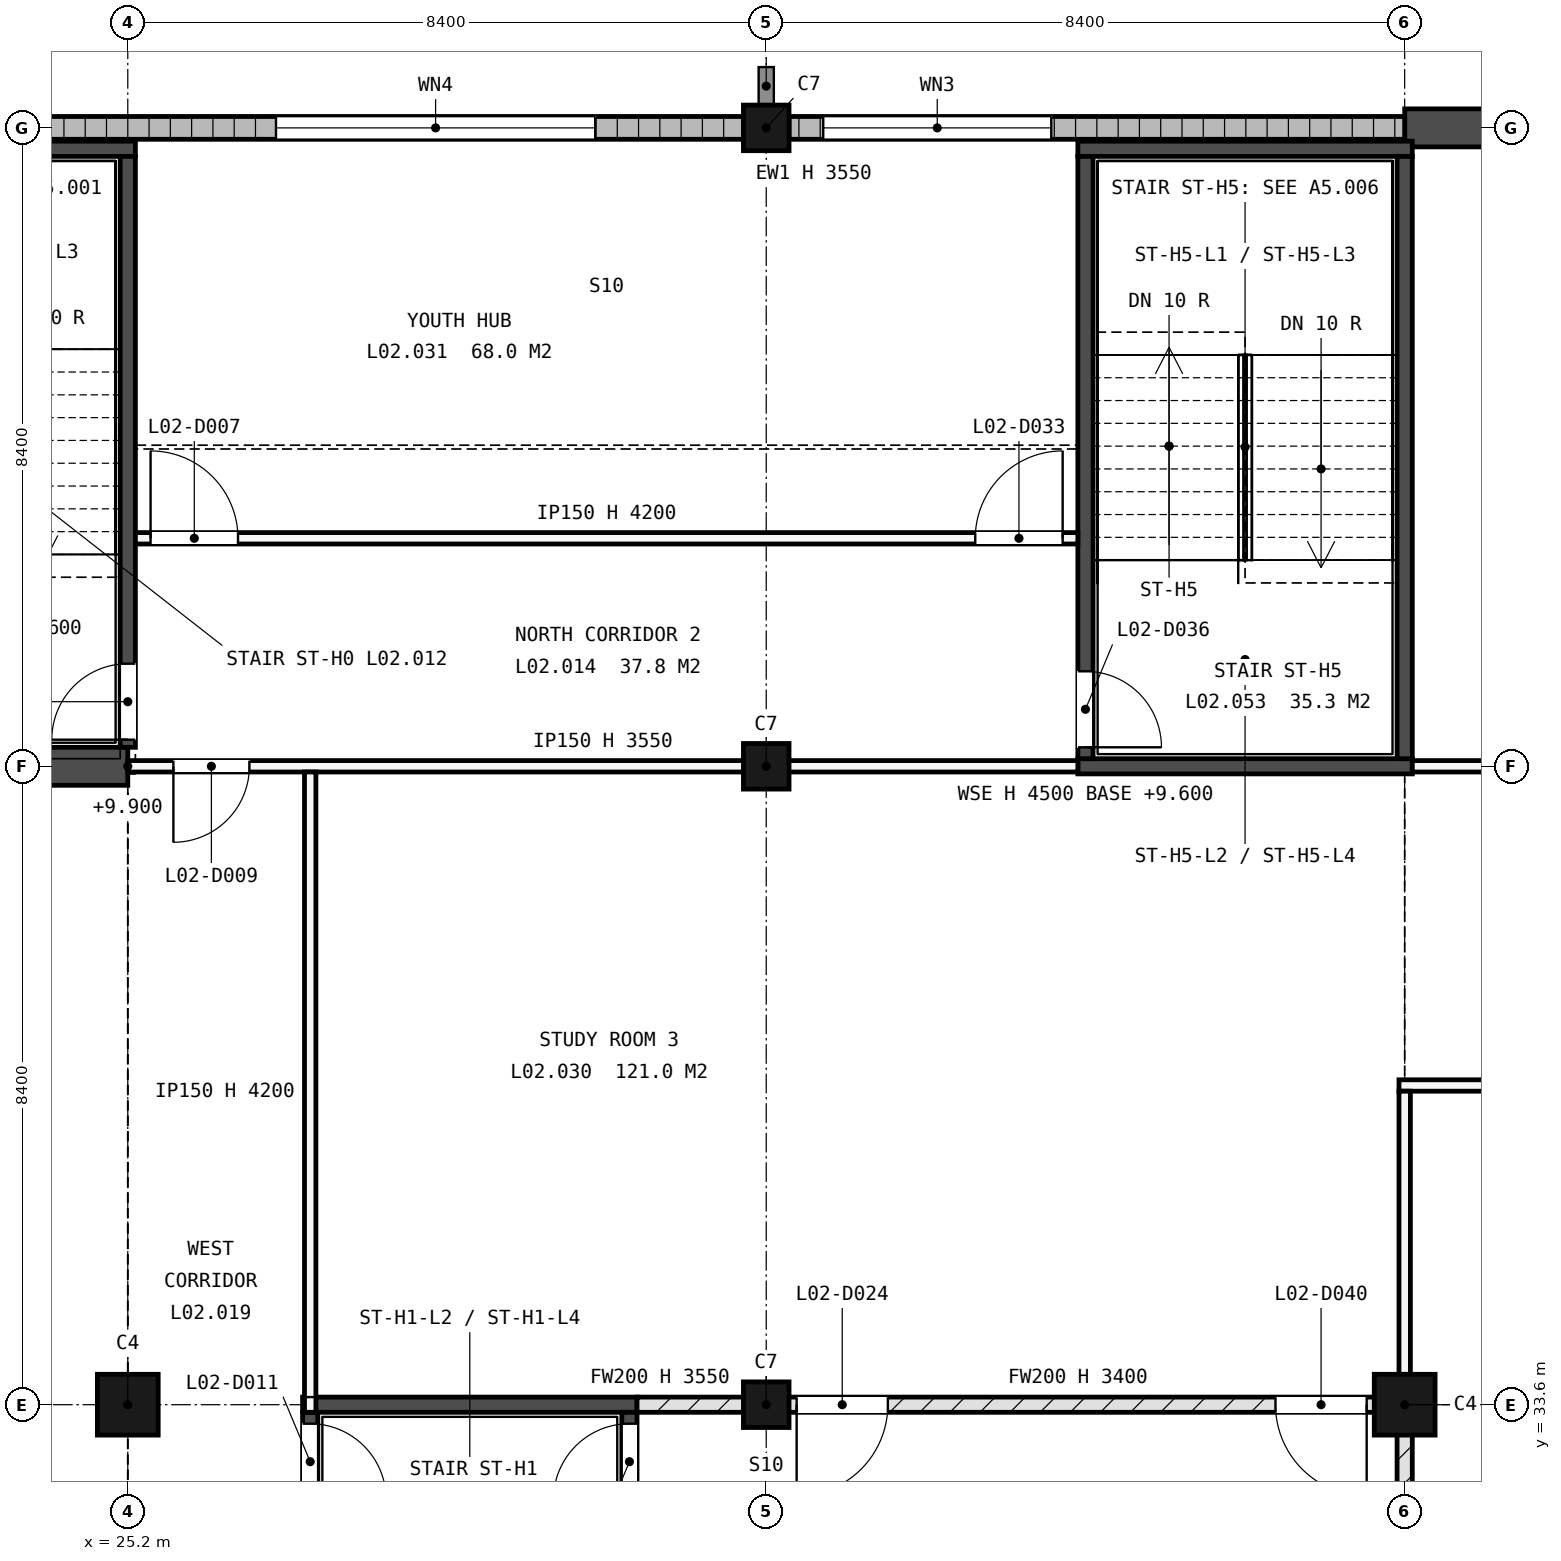
"""IFC4 building model, lengths in metres.
Left out: names, types, materials, properties, quantities, classifications, styles, units other than length and angle.
Written with IfcOpenShell. Run it as: python <this file> out.ifc"""

import sys

from ifc_helpers import new_model, si_unit, direction, frame, frame_2d, origin, origin_2d, place, context, subcontext, project, spatial, polyline, rectangle, outline, extrude, element, fill, save


model = new_model("IFC4")
c1 = context("Model", 3, precision=1e-05, world=origin(), true_north=direction((0.0, 1.0)))
c2 = subcontext(c1, "Body", "Model", "MODEL_VIEW")
j1 = project(units=[si_unit("LENGTHUNIT", "METRE"), si_unit("PLANEANGLEUNIT", "RADIAN")], contexts=[c1])
p1 = place(None, origin())
s1 = spatial("IfcSite", under=j1, at=p1, CompositionType="ELEMENT")
p2 = place(p1, origin())
s2 = spatial("IfcBuilding", under=s1, at=p2, CompositionType="ELEMENT")
p3 = place(p2, frame((0.0, 0.0, 9.9)))
s3 = spatial("IfcBuildingStorey", under=s2, at=p3, CompositionType="ELEMENT", Elevation=9.9)
p4 = place(p3, frame((25.2, 33.6, -0.25), z_axis=(0.0, 0.0, 1.0), x_axis=(1.0, 0.0, 0.0)))
e1 = element("IfcColumn", 1, at=p4, inside=s3, PredefinedType="COLUMN", context=c2, shape_type="SweptSolid", body=[
    extrude(rectangle(XDim=0.8, YDim=0.8, at=origin_2d()), origin(), (0.0, 0.0, 1.0), 4.45),
])
for number, where, z_axis, x_axis in (
    (2, (33.6, 33.6, -0.25), (0.0, 0.0, 1.0), (1.0, 0.0, 0.0)),
    (3, (33.6, 42.0, -0.25), (0.0, 0.0, 1.0), (1.0, 0.0, 0.0)),
    (4, (33.6, 50.4, -0.25), (0.0, 0.0, 1.0), (1.0, 0.0, 0.0)),
):
    element("IfcColumn", number, at=place(p3, frame(where, z_axis=z_axis, x_axis=x_axis)), inside=s3, PredefinedType="COLUMN", context=c2, shape_type="SweptSolid", body=[
        extrude(rectangle(XDim=0.6, YDim=0.6, at=origin_2d()), origin(), (0.0, 0.0, 1.0), 4.45),
    ])
p5 = place(p3, frame((42.0, 33.6, -0.25), z_axis=(0.0, 0.0, 1.0), x_axis=(1.0, 0.0, 0.0)))
e5 = element("IfcColumn", 5, at=p5, inside=s3, PredefinedType="COLUMN", context=c2, shape_type="SweptSolid", body=[
    extrude(rectangle(XDim=0.8, YDim=0.8, at=origin_2d()), origin(), (0.0, 0.0, 1.0), 4.45),
])
p6 = place(p3, frame((42.0, 50.4, -0.25), z_axis=(0.0, 0.0, 1.0), x_axis=(1.0, 0.0, 0.0)))
e6 = element("IfcWall", 6, at=p6, inside=s3, PredefinedType="SHEAR", context=c2, shape_type="SweptSolid", body=[
    extrude(rectangle(XDim=42.0, YDim=0.5, at=frame_2d((21.0, 0.0))), origin(), (0.0, 0.0, 1.0), 4.45),
])
p7 = place(p3, frame((0.0, 42.0, -0.25), z_axis=(0.0, 0.0, 1.0), x_axis=(1.0, 0.0, 0.0)))
e7 = element("IfcWall", 7, at=p7, inside=s3, PredefinedType="SHEAR", context=c2, shape_type="SweptSolid", body=[
    extrude(outline(polyline([(0.0, 0.0), (25.2, 0.0), (25.201, 0.05), (25.2, 4.45), (21.0, 4.45), (20.999, 3.973), (16.8, 0.05), (12.6, 3.974), (8.4, 0.05), (4.2, 3.974), (0.0, 0.05), (0.0, 0.0)])), frame((0.0, 0.25, 0.0), z_axis=(0.0, -1.0, 0.0), x_axis=(1.0, 0.0, 0.0)), (0.0, 0.0, 1.0), 0.5),
])
p8 = place(p3, frame((17.1, 50.4, 0.0), z_axis=(0.0, 0.0, 1.0), x_axis=(1.0, 0.0, 0.0)))
e8 = element("IfcWall", 8, at=p8, inside=s3, PredefinedType="STANDARD", context=c2, shape_type="SweptSolid", body=[
    extrude(rectangle(XDim=16.2, YDim=0.3, at=frame_2d((8.1, 0.0))), origin(), (0.0, 0.0, 1.0), 3.55),
])
p9 = place(p8, frame((0.45, 0.0, 2.4)))
e9 = element("IfcOpeningElement", 9, at=p9, cuts=e8, PredefinedType="OPENING", context=c2, shape_type="SweptSolid", body=[
    extrude(rectangle(XDim=3.0, YDim=0.9, at=frame_2d((1.5, 0.45))), frame((0.0, 0.16, 0.0), z_axis=(0.0, -1.0, 0.0), x_axis=(1.0, 0.0, 0.0)), (0.0, 0.0, 1.0), 0.32),
])
p10 = place(p8, frame((10.05, 0.0, 0.9)))
e10 = element("IfcOpeningElement", 10, at=p10, cuts=e8, PredefinedType="OPENING", context=c2, shape_type="SweptSolid", body=[
    extrude(rectangle(XDim=4.2, YDim=1.5, at=frame_2d((2.1, 0.75))), frame((0.0, 0.16, 0.0), z_axis=(0.0, -1.0, 0.0), x_axis=(1.0, 0.0, 0.0)), (0.0, 0.0, 1.0), 0.32),
])
p11 = place(p3, frame((33.9, 50.4, 0.0), z_axis=(0.0, 0.0, 1.0), x_axis=(1.0, 0.0, 0.0)))
e11 = element("IfcWall", 11, at=p11, inside=s3, PredefinedType="STANDARD", context=c2, shape_type="SweptSolid", body=[
    extrude(rectangle(XDim=8.1, YDim=0.3, at=frame_2d((4.05, 0.0))), origin(), (0.0, 0.0, 1.0), 3.55),
])
p12 = place(p11, frame((0.45, 0.0, 0.9)))
e12 = element("IfcOpeningElement", 12, at=p12, cuts=e11, PredefinedType="OPENING", context=c2, shape_type="SweptSolid", body=[
    extrude(rectangle(XDim=3.0, YDim=1.5, at=frame_2d((1.5, 0.75))), frame((0.0, 0.16, 0.0), z_axis=(0.0, -1.0, 0.0), x_axis=(1.0, 0.0, 0.0)), (0.0, 0.0, 1.0), 0.32),
])
p13 = place(p3, frame((20.9, 50.125, -0.3), z_axis=(0.0, 0.0, 1.0), x_axis=(1.0, 0.0, 0.0)))
e13 = element("IfcWall", 13, at=p13, inside=s3, PredefinedType="SHEAR", context=c2, shape_type="SweptSolid", body=[
    extrude(rectangle(XDim=4.4, YDim=0.2, at=frame_2d((2.2, 0.0))), origin(), (0.0, 0.0, 1.0), 4.5),
])
p14 = place(p3, frame((25.2, 42.25, -0.3), z_axis=(0.0, 0.0, 1.0), x_axis=(0.0, 1.0, 0.0)))
e14 = element("IfcWall", 14, at=p14, inside=s3, PredefinedType="SHEAR", context=c2, shape_type="SweptSolid", body=[
    extrude(rectangle(XDim=7.775, YDim=0.2, at=frame_2d((3.887, 0.0))), origin(), (0.0, 0.0, 1.0), 4.5),
])
p15 = place(p14, frame((0.1, 0.0, 0.3)))
e15 = element("IfcOpeningElement", 15, at=p15, cuts=e14, PredefinedType="OPENING", context=c2, shape_type="SweptSolid", body=[
    extrude(rectangle(XDim=1.0, YDim=2.1, at=frame_2d((0.5, 1.05))), frame((0.0, 0.11, 0.0), z_axis=(0.0, -1.0, 0.0), x_axis=(1.0, 0.0, 0.0)), (0.0, 0.0, 1.0), 0.22),
])
p16 = place(p3, frame((27.5, 33.6, -0.3), z_axis=(0.0, 0.0, 1.0), x_axis=(1.0, 0.0, 0.0)))
e16 = element("IfcWall", 16, at=p16, inside=s3, PredefinedType="SHEAR", context=c2, shape_type="SweptSolid", body=[
    extrude(rectangle(XDim=4.4, YDim=0.2, at=frame_2d((2.2, 0.0))), origin(), (0.0, 0.0, 1.0), 4.5),
])
p17 = place(p3, frame((27.6, 25.3, -0.3), z_axis=(0.0, 0.0, 1.0), x_axis=(0.0, 1.0, 0.0)))
e17 = element("IfcWall", 17, at=p17, inside=s3, PredefinedType="SHEAR", context=c2, shape_type="SweptSolid", body=[
    extrude(rectangle(XDim=8.2, YDim=0.2, at=frame_2d((4.1, 0.0))), origin(), (0.0, 0.0, 1.0), 4.5),
])
p18 = place(p17, frame((7.05, 0.0, 0.3)))
e18 = element("IfcOpeningElement", 18, at=p18, cuts=e17, PredefinedType="OPENING", context=c2, shape_type="SweptSolid", body=[
    extrude(rectangle(XDim=1.0, YDim=2.1, at=frame_2d((0.5, 1.05))), frame((0.0, 0.11, 0.0), z_axis=(0.0, -1.0, 0.0), x_axis=(1.0, 0.0, 0.0)), (0.0, 0.0, 1.0), 0.22),
])
p19 = place(p3, frame((31.8, 25.3, -0.3), z_axis=(0.0, 0.0, 1.0), x_axis=(0.0, 1.0, 0.0)))
e19 = element("IfcWall", 19, at=p19, inside=s3, PredefinedType="SHEAR", context=c2, shape_type="SweptSolid", body=[
    extrude(rectangle(XDim=8.2, YDim=0.2, at=frame_2d((4.1, 0.0))), origin(), (0.0, 0.0, 1.0), 4.5),
])
p20 = place(p19, frame((7.05, 0.0, 0.3)))
e20 = element("IfcOpeningElement", 20, at=p20, cuts=e19, PredefinedType="OPENING", context=c2, shape_type="SweptSolid", body=[
    extrude(rectangle(XDim=1.0, YDim=2.1, at=frame_2d((0.5, 1.05))), frame((0.0, 0.11, 0.0), z_axis=(0.0, -1.0, 0.0), x_axis=(1.0, 0.0, 0.0)), (0.0, 0.0, 1.0), 0.22),
])
for number, where, z_axis, x_axis in (
    (21, (37.7, 42.0, -0.3), (0.0, 0.0, 1.0), (1.0, 0.0, 0.0)),
    (22, (37.7, 50.125, -0.3), (0.0, 0.0, 1.0), (1.0, 0.0, 0.0)),
):
    element("IfcWall", number, at=place(p3, frame(where, z_axis=z_axis, x_axis=x_axis)), inside=s3, PredefinedType="SHEAR", context=c2, shape_type="SweptSolid", body=[
        extrude(rectangle(XDim=4.4, YDim=0.2, at=frame_2d((2.2, 0.0))), origin(), (0.0, 0.0, 1.0), 4.5),
    ])
p21 = place(p3, frame((37.8, 42.1, -0.3), z_axis=(0.0, 0.0, 1.0), x_axis=(0.0, 1.0, 0.0)))
e23 = element("IfcWall", 23, at=p21, inside=s3, PredefinedType="SHEAR", context=c2, shape_type="SweptSolid", body=[
    extrude(rectangle(XDim=7.925, YDim=0.2, at=frame_2d((3.962, 0.0))), origin(), (0.0, 0.0, 1.0), 4.5),
])
p22 = place(p21, frame((0.15, 0.0, 0.3)))
e24 = element("IfcOpeningElement", 24, at=p22, cuts=e23, PredefinedType="OPENING", context=c2, shape_type="SweptSolid", body=[
    extrude(rectangle(XDim=1.0, YDim=2.1, at=frame_2d((0.5, 1.05))), frame((0.0, 0.11, 0.0), z_axis=(0.0, -1.0, 0.0), x_axis=(1.0, 0.0, 0.0)), (0.0, 0.0, 1.0), 0.22),
])
p23 = place(p3, frame((42.0, 42.1, -0.3), z_axis=(0.0, 0.0, 1.0), x_axis=(0.0, 1.0, 0.0)))
e25 = element("IfcWall", 25, at=p23, inside=s3, PredefinedType="SHEAR", context=c2, shape_type="SweptSolid", body=[
    extrude(rectangle(XDim=7.925, YDim=0.2, at=frame_2d((3.962, 0.0))), origin(), (0.0, 0.0, 1.0), 4.5),
])
p24 = place(p3, frame((41.925, 37.8, -0.3), z_axis=(0.0, 0.0, 1.0), x_axis=(1.0, 0.0, 0.0)))
e26 = element("IfcWall", 26, at=p24, inside=s3, PredefinedType="PARTITIONING", context=c2, shape_type="SweptSolid", body=[
    extrude(rectangle(XDim=42.15, YDim=0.15, at=frame_2d((21.075, 0.0))), origin(), (0.0, 0.0, 1.0), 4.5),
])
p25 = place(p3, frame((42.1, 42.0, -0.3), z_axis=(0.0, 0.0, 1.0), x_axis=(1.0, 0.0, 0.0)))
e27 = element("IfcWall", 27, at=p25, inside=s3, PredefinedType="PARTITIONING", context=c2, shape_type="SweptSolid", body=[
    extrude(rectangle(XDim=41.9, YDim=0.15, at=frame_2d((20.95, 0.0))), origin(), (0.0, 0.0, 1.0), 4.5),
])
p26 = place(p3, frame((42.0, 25.3, -0.3), z_axis=(0.0, 0.0, 1.0), x_axis=(0.0, 1.0, 0.0)))
e28 = element("IfcWall", 28, at=p26, inside=s3, PredefinedType="SOLIDWALL", context=c2, shape_type="SweptSolid", body=[
    extrude(rectangle(XDim=8.2, YDim=0.2, at=frame_2d((4.1, 0.0))), origin(), (0.0, 0.0, 1.0), 4.5),
])
p27 = place(p3, frame((42.0, 33.7, -0.3), z_axis=(0.0, 0.0, 1.0), x_axis=(0.0, 1.0, 0.0)))
e29 = element("IfcWall", 29, at=p27, inside=s3, PredefinedType="PARTITIONING", context=c2, shape_type="SweptSolid", body=[
    extrude(rectangle(XDim=4.025, YDim=0.15, at=frame_2d((2.013, 0.0))), origin(), (0.0, 0.0, 1.0), 4.5),
])
p28 = place(p2, frame((0.0, 0.0, 5.4)))
s4 = spatial("IfcBuildingStorey", under=s2, at=p28, CompositionType="ELEMENT", Elevation=5.4)
p29 = place(p28, frame((42.0, 37.8, 0.0), z_axis=(0.0, 0.0, 1.0), x_axis=(0.0, 1.0, 0.0)))
e30 = element("IfcWall", 30, at=p29, inside=s4, PredefinedType="PARTITIONING", context=c2, shape_type="SweptSolid", body=[
    extrude(rectangle(XDim=4.3, YDim=0.15, at=frame_2d((2.15, 0.0))), origin(), (0.0, 0.0, 1.0), 8.7),
])
p30 = place(p29, frame((1.6, 0.0, 0.0)))
e31 = element("IfcOpeningElement", 31, at=p30, cuts=e30, PredefinedType="OPENING", context=c2, shape_type="SweptSolid", body=[
    extrude(rectangle(XDim=1.0, YDim=2.1, at=frame_2d((0.5, 1.05))), frame((0.0, 0.085, 0.0), z_axis=(0.0, -1.0, 0.0), x_axis=(1.0, 0.0, 0.0)), (0.0, 0.0, 1.0), 0.17),
])
p31 = place(p3, frame((31.9, 33.6, 0.0), z_axis=(0.0, 0.0, 1.0), x_axis=(1.0, 0.0, 0.0)))
e32 = element("IfcWall", 32, at=p31, inside=s3, PredefinedType="SOLIDWALL", context=c2, shape_type="SweptSolid", body=[
    extrude(rectangle(XDim=1.5, YDim=0.2, at=frame_2d((0.75, 0.0))), origin(), (0.0, 0.0, 1.0), 3.55),
])
p32 = place(p3, frame((33.4, 33.6, 0.0), z_axis=(0.0, 0.0, 1.0), x_axis=(1.0, 0.0, 0.0)))
e33 = element("IfcWall", 33, at=p32, inside=s3, PredefinedType="SOLIDWALL", context=c2, shape_type="SweptSolid", body=[
    extrude(rectangle(XDim=8.6, YDim=0.2, at=frame_2d((4.3, 0.0))), origin(), (0.0, 0.0, 1.0), 3.4),
])
p33 = place(p32, frame((0.6, 0.0, 0.0)))
e34 = element("IfcOpeningElement", 34, at=p33, cuts=e33, PredefinedType="OPENING", context=c2, shape_type="SweptSolid", body=[
    extrude(rectangle(XDim=1.2, YDim=2.1, at=frame_2d((0.6, 1.05))), frame((0.0, 0.11, 0.0), z_axis=(0.0, -1.0, 0.0), x_axis=(1.0, 0.0, 0.0)), (0.0, 0.0, 1.0), 0.22),
])
p34 = place(p32, frame((6.9, 0.0, 0.0)))
e35 = element("IfcOpeningElement", 35, at=p34, cuts=e33, PredefinedType="OPENING", context=c2, shape_type="SweptSolid", body=[
    extrude(rectangle(XDim=1.2, YDim=2.1, at=frame_2d((0.6, 1.05))), frame((0.0, 0.11, 0.0), z_axis=(0.0, -1.0, 0.0), x_axis=(1.0, 0.0, 0.0)), (0.0, 0.0, 1.0), 0.22),
])
p35 = place(p3, frame((25.2, 42.0, 0.0), z_axis=(0.0, 0.0, 1.0), x_axis=(1.0, 0.0, 0.0)))
e36 = element("IfcWall", 36, at=p35, inside=s3, PredefinedType="PARTITIONING", context=c2, shape_type="SweptSolid", body=[
    extrude(rectangle(XDim=12.5, YDim=0.15, at=frame_2d((6.25, 0.0))), origin(), (0.0, 0.0, 1.0), 3.55),
])
p36 = place(p35, frame((0.6, 0.0, 0.0)))
e37 = element("IfcOpeningElement", 37, at=p36, cuts=e36, PredefinedType="OPENING", context=c2, shape_type="SweptSolid", body=[
    extrude(rectangle(XDim=1.0, YDim=2.1, at=frame_2d((0.5, 1.05))), frame((0.0, 0.085, 0.0), z_axis=(0.0, -1.0, 0.0), x_axis=(1.0, 0.0, 0.0)), (0.0, 0.0, 1.0), 0.17),
])
p37 = place(p3, frame((25.3, 45.0, 0.0), z_axis=(0.0, 0.0, 1.0), x_axis=(1.0, 0.0, 0.0)))
e38 = element("IfcWall", 38, at=p37, inside=s3, PredefinedType="PARTITIONING", context=c2, shape_type="SweptSolid", body=[
    extrude(rectangle(XDim=12.4, YDim=0.15, at=frame_2d((6.2, 0.0))), origin(), (0.0, 0.0, 1.0), 4.2),
])
p38 = place(p37, frame((0.2, 0.0, 0.0)))
e39 = element("IfcOpeningElement", 39, at=p38, cuts=e38, PredefinedType="OPENING", context=c2, shape_type="SweptSolid", body=[
    extrude(rectangle(XDim=1.15, YDim=2.1, at=frame_2d((0.575, 1.05))), frame((0.0, 0.085, 0.0), z_axis=(0.0, -1.0, 0.0), x_axis=(1.0, 0.0, 0.0)), (0.0, 0.0, 1.0), 0.17),
])
p39 = place(p37, frame((11.05, 0.0, 0.0)))
e40 = element("IfcOpeningElement", 40, at=p39, cuts=e38, PredefinedType="OPENING", context=c2, shape_type="SweptSolid", body=[
    extrude(rectangle(XDim=1.15, YDim=2.1, at=frame_2d((0.575, 1.05))), frame((0.0, 0.085, 0.0), z_axis=(0.0, -1.0, 0.0), x_axis=(1.0, 0.0, 0.0)), (0.0, 0.0, 1.0), 0.17),
])
p40 = place(p3, frame((27.6, 33.5, 0.0), z_axis=(0.0, 0.0, 1.0), x_axis=(0.0, 1.0, 0.0)))
e41 = element("IfcWall", 41, at=p40, inside=s3, PredefinedType="PARTITIONING", context=c2, shape_type="SweptSolid", body=[
    extrude(rectangle(XDim=8.425, YDim=0.15, at=frame_2d((4.212, 0.0))), origin(), (0.0, 0.0, 1.0), 4.2),
])
p41 = place(p10, origin())
e42 = element("IfcWindow", 42, at=p41, inside=s3, PartitioningType="SINGLE_PANEL", PredefinedType="WINDOW", context=c2, shape_type="SweptSolid", body=[
    extrude(rectangle(XDim=4.2, YDim=1.5, at=frame_2d((2.1, 0.75))), frame((0.0, 0.03, 0.0), z_axis=(0.0, -1.0, 0.0), x_axis=(1.0, 0.0, 0.0)), (0.0, 0.0, 1.0), 0.06),
])
fill(e10, e42)
p42 = place(p12, origin())
e43 = element("IfcWindow", 43, at=p42, inside=s3, PartitioningType="SINGLE_PANEL", PredefinedType="WINDOW", context=c2, shape_type="SweptSolid", body=[
    extrude(rectangle(XDim=3.0, YDim=1.5, at=frame_2d((1.5, 0.75))), frame((0.0, 0.03, 0.0), z_axis=(0.0, -1.0, 0.0), x_axis=(1.0, 0.0, 0.0)), (0.0, 0.0, 1.0), 0.06),
])
fill(e12, e43)
p43 = place(p15, origin())
e44 = element("IfcDoor", 44, at=p43, inside=s3, OperationType="SINGLE_SWING_RIGHT", PredefinedType="DOOR", context=c2, shape_type="SweptSolid", body=[
    extrude(rectangle(XDim=1.0, YDim=2.1, at=frame_2d((0.5, 1.05))), frame((0.0, 0.025, 0.0), z_axis=(0.0, -1.0, 0.0), x_axis=(1.0, 0.0, 0.0)), (0.0, 0.0, 1.0), 0.05),
])
fill(e15, e44)
p44 = place(p18, origin())
e45 = element("IfcDoor", 45, at=p44, inside=s3, OperationType="SINGLE_SWING_LEFT", PredefinedType="DOOR", context=c2, shape_type="SweptSolid", body=[
    extrude(rectangle(XDim=1.0, YDim=2.1, at=frame_2d((0.5, 1.05))), frame((0.0, 0.025, 0.0), z_axis=(0.0, -1.0, 0.0), x_axis=(1.0, 0.0, 0.0)), (0.0, 0.0, 1.0), 0.05),
])
fill(e18, e45)
p45 = place(p20, origin())
e46 = element("IfcDoor", 46, at=p45, inside=s3, OperationType="SINGLE_SWING_RIGHT", PredefinedType="DOOR", context=c2, shape_type="SweptSolid", body=[
    extrude(rectangle(XDim=1.0, YDim=2.1, at=frame_2d((0.5, 1.05))), frame((0.0, 0.025, 0.0), z_axis=(0.0, -1.0, 0.0), x_axis=(1.0, 0.0, 0.0)), (0.0, 0.0, 1.0), 0.05),
])
fill(e20, e46)
p46 = place(p22, origin())
e47 = element("IfcDoor", 47, at=p46, inside=s3, OperationType="SINGLE_SWING_LEFT", PredefinedType="DOOR", context=c2, shape_type="SweptSolid", body=[
    extrude(rectangle(XDim=1.0, YDim=2.1, at=frame_2d((0.5, 1.05))), frame((0.0, 0.025, 0.0), z_axis=(0.0, -1.0, 0.0), x_axis=(1.0, 0.0, 0.0)), (0.0, 0.0, 1.0), 0.05),
])
fill(e24, e47)
p47 = place(p33, origin())
e48 = element("IfcDoor", 48, at=p47, inside=s3, OperationType="SINGLE_SWING_LEFT", PredefinedType="DOOR", context=c2, shape_type="SweptSolid", body=[
    extrude(rectangle(XDim=1.2, YDim=2.1, at=frame_2d((0.6, 1.05))), frame((0.0, 0.025, 0.0), z_axis=(0.0, -1.0, 0.0), x_axis=(1.0, 0.0, 0.0)), (0.0, 0.0, 1.0), 0.05),
])
fill(e34, e48)
p48 = place(p34, origin())
e49 = element("IfcDoor", 49, at=p48, inside=s3, OperationType="SINGLE_SWING_RIGHT", PredefinedType="DOOR", context=c2, shape_type="SweptSolid", body=[
    extrude(rectangle(XDim=1.2, YDim=2.1, at=frame_2d((0.6, 1.05))), frame((0.0, 0.025, 0.0), z_axis=(0.0, -1.0, 0.0), x_axis=(1.0, 0.0, 0.0)), (0.0, 0.0, 1.0), 0.05),
])
fill(e35, e49)
p49 = place(p38, origin())
e50 = element("IfcDoor", 50, at=p49, inside=s3, OperationType="SINGLE_SWING_RIGHT", PredefinedType="DOOR", context=c2, shape_type="SweptSolid", body=[
    extrude(rectangle(XDim=1.15, YDim=2.1, at=frame_2d((0.575, 1.05))), frame((0.0, 0.025, 0.0), z_axis=(0.0, -1.0, 0.0), x_axis=(1.0, 0.0, 0.0)), (0.0, 0.0, 1.0), 0.05),
])
fill(e39, e50)
p50 = place(p39, origin())
e51 = element("IfcDoor", 51, at=p50, inside=s3, OperationType="SINGLE_SWING_LEFT", PredefinedType="DOOR", context=c2, shape_type="SweptSolid", body=[
    extrude(rectangle(XDim=1.15, YDim=2.1, at=frame_2d((0.575, 1.05))), frame((0.0, 0.025, 0.0), z_axis=(0.0, -1.0, 0.0), x_axis=(1.0, 0.0, 0.0)), (0.0, 0.0, 1.0), 0.05),
])
fill(e40, e51)
p51 = place(p36, origin())
e52 = element("IfcDoor", 52, at=p51, inside=s3, OperationType="SINGLE_SWING_LEFT", PredefinedType="DOOR", context=c2, shape_type="SweptSolid", body=[
    extrude(rectangle(XDim=1.0, YDim=2.1, at=frame_2d((0.5, 1.05))), frame((0.0, 0.025, 0.0), z_axis=(0.0, -1.0, 0.0), x_axis=(1.0, 0.0, 0.0)), (0.0, 0.0, 1.0), 0.05),
])
fill(e37, e52)
save(model, sys.argv[1])
